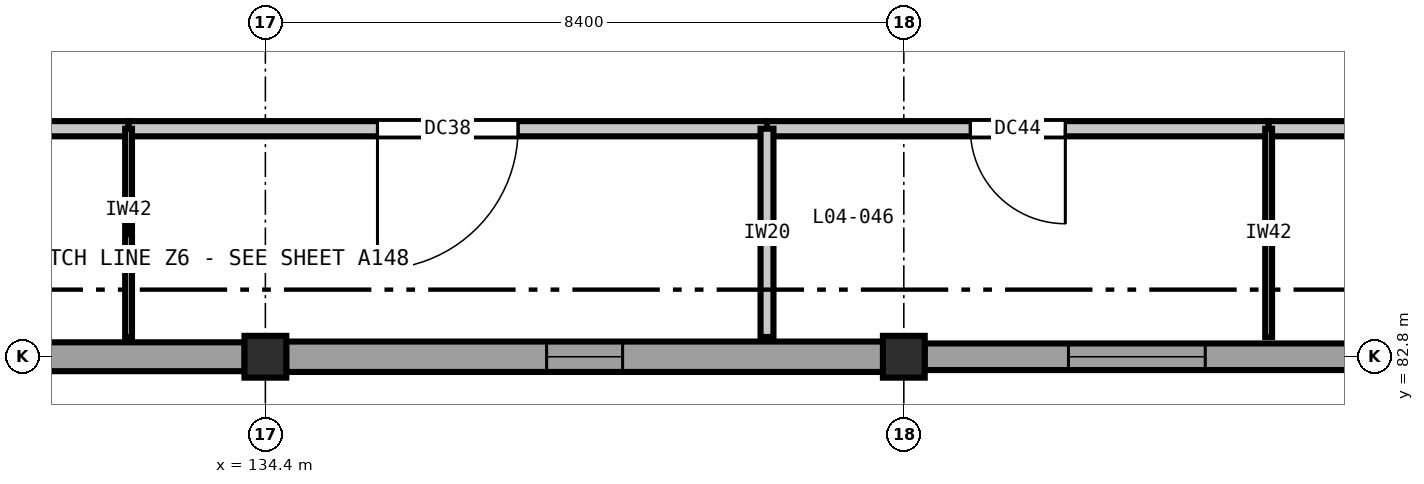
"""IFC4 building model, lengths in metres.
Left out: names, types, materials, properties, quantities, classifications, styles, units other than length and angle.
Written with IfcOpenShell. Run it as: python <this file> out.ifc"""

import sys

from ifc_helpers import new_model, si_unit, direction, frame, frame_2d, origin, origin_2d, place, context, subcontext, project, spatial, rectangle, extrude, element, fill, save


model = new_model("IFC4")
c1 = context("Model", 3, precision=1e-05, world=origin(), true_north=direction((0.0, 1.0)))
c2 = subcontext(c1, "Body", "Model", "MODEL_VIEW")
j1 = project(units=[si_unit("LENGTHUNIT", "METRE"), si_unit("PLANEANGLEUNIT", "RADIAN")], contexts=[c1])
p1 = place(None, origin())
s1 = spatial("IfcSite", under=j1, at=p1, CompositionType="ELEMENT")
p2 = place(p1, origin())
s2 = spatial("IfcBuilding", under=s1, at=p2, CompositionType="ELEMENT")
p3 = place(p2, frame((0.0, 0.0, 20.4)))
s3 = spatial("IfcBuildingStorey", under=s2, at=p3, CompositionType="ELEMENT", Elevation=20.4)
for number, where, z_axis, x_axis in (
    (1, (134.4, 82.8, 0.0), (0.0, 0.0, 1.0), (1.0, 0.0, 0.0)),
    (2, (142.8, 82.8, 0.0), (0.0, 0.0, 1.0), (1.0, 0.0, 0.0)),
):
    element("IfcColumn", number, at=place(p3, frame(where, z_axis=z_axis, x_axis=x_axis)), inside=s3, PredefinedType="COLUMN", context=c2, shape_type="SweptSolid", body=[
        extrude(rectangle(XDim=0.55, YDim=0.55, at=origin_2d()), origin(), (0.0, 0.0, 1.0), 4.2),
    ])
p4 = place(p3, frame((150.927, 82.8, 0.0), z_axis=(0.0, 0.0, 1.0), x_axis=(-1.0, 0.0, 0.0)))
e3 = element("IfcWall", 3, at=p4, inside=s3, PredefinedType="SOLIDWALL", context=c2, shape_type="SweptSolid", body=[
    extrude(rectangle(XDim=7.854, YDim=0.35, at=frame_2d((3.927, 0.0))), origin(), (0.0, 0.0, 1.0), 3.48),
])
p5 = place(p4, frame((4.161, 0.0, 0.9)))
e4 = element("IfcOpeningElement", 4, at=p5, cuts=e3, PredefinedType="OPENING", context=c2, shape_type="SweptSolid", body=[
    extrude(rectangle(XDim=1.8, YDim=1.55, at=frame_2d((0.9, 0.775))), frame((0.0, 0.185, 0.0), z_axis=(0.0, -1.0, 0.0), x_axis=(1.0, 0.0, 0.0)), (0.0, 0.0, 1.0), 0.37),
])
p6 = place(p3, frame((142.527, 82.8, 0.0), z_axis=(0.0, 0.0, 1.0), x_axis=(-1.0, 0.0, 0.0)))
e5 = element("IfcWall", 5, at=p6, inside=s3, PredefinedType="SOLIDWALL", context=c2, shape_type="SweptSolid", body=[
    extrude(rectangle(XDim=7.854, YDim=0.4, at=frame_2d((3.927, 0.0))), origin(), (0.0, 0.0, 1.0), 3.48),
])
p7 = place(p6, frame((3.427, 0.0, 0.9)))
e6 = element("IfcOpeningElement", 6, at=p7, cuts=e5, PredefinedType="OPENING", context=c2, shape_type="SweptSolid", body=[
    extrude(rectangle(XDim=1.0, YDim=1.75, at=frame_2d((0.5, 0.875))), frame((0.0, 0.21, 0.0), z_axis=(0.0, -1.0, 0.0), x_axis=(1.0, 0.0, 0.0)), (0.0, 0.0, 1.0), 0.42),
])
p8 = place(p3, frame((134.127, 82.8, 0.0), z_axis=(0.0, 0.0, 1.0), x_axis=(-1.0, 0.0, 0.0)))
e7 = element("IfcWall", 7, at=p8, inside=s3, PredefinedType="SOLIDWALL", context=c2, shape_type="SweptSolid", body=[
    extrude(rectangle(XDim=7.854, YDim=0.38, at=frame_2d((3.927, 0.0))), origin(), (0.0, 0.0, 1.0), 3.48),
])
p9 = place(p8, frame((3.352, 0.0, 0.9)))
e8 = element("IfcOpeningElement", 8, at=p9, cuts=e7, PredefinedType="OPENING", context=c2, shape_type="SweptSolid", body=[
    extrude(rectangle(XDim=1.15, YDim=1.75, at=frame_2d((0.575, 0.875))), frame((0.0, 0.2, 0.0), z_axis=(0.0, -1.0, 0.0), x_axis=(1.0, 0.0, 0.0)), (0.0, 0.0, 1.0), 0.4),
])
p10 = place(p3, frame((126.0, 85.8, 0.0), z_axis=(0.0, 0.0, 1.0), x_axis=(1.0, 0.0, 0.0)))
e9 = element("IfcWall", 9, at=p10, inside=s3, PredefinedType="PARTITIONING", context=c2, shape_type="SweptSolid", body=[
    extrude(rectangle(XDim=6.6, YDim=0.2, at=frame_2d((3.3, 0.0))), origin(), (0.0, 0.0, 1.0), 3.82),
])
p11 = place(p10, frame((2.45, 0.0, 0.0)))
e10 = element("IfcOpeningElement", 10, at=p11, cuts=e9, PredefinedType="OPENING", context=c2, shape_type="SweptSolid", body=[
    extrude(rectangle(XDim=1.7, YDim=2.3, at=frame_2d((0.85, 1.15))), frame((0.0, 0.11, 0.0), z_axis=(0.0, -1.0, 0.0), x_axis=(1.0, 0.0, 0.0)), (0.0, 0.0, 1.0), 0.22),
])
p12 = place(p3, frame((132.6, 85.8, 0.0), z_axis=(0.0, 0.0, 1.0), x_axis=(1.0, 0.0, 0.0)))
e11 = element("IfcWall", 11, at=p12, inside=s3, PredefinedType="PARTITIONING", context=c2, shape_type="SweptSolid", body=[
    extrude(rectangle(XDim=8.4, YDim=0.2, at=frame_2d((4.2, 0.0))), origin(), (0.0, 0.0, 1.0), 3.82),
])
p13 = place(p12, frame((3.275, 0.0, 0.0)))
e12 = element("IfcOpeningElement", 12, at=p13, cuts=e11, PredefinedType="OPENING", context=c2, shape_type="SweptSolid", body=[
    extrude(rectangle(XDim=1.85, YDim=2.3, at=frame_2d((0.925, 1.15))), frame((0.0, 0.11, 0.0), z_axis=(0.0, -1.0, 0.0), x_axis=(1.0, 0.0, 0.0)), (0.0, 0.0, 1.0), 0.22),
])
p14 = place(p3, frame((141.0, 85.8, 0.0), z_axis=(0.0, 0.0, 1.0), x_axis=(1.0, 0.0, 0.0)))
e13 = element("IfcWall", 13, at=p14, inside=s3, PredefinedType="PARTITIONING", context=c2, shape_type="SweptSolid", body=[
    extrude(rectangle(XDim=6.6, YDim=0.2, at=frame_2d((3.3, 0.0))), origin(), (0.0, 0.0, 1.0), 3.82),
])
p15 = place(p14, frame((2.675, 0.0, 0.0)))
e14 = element("IfcOpeningElement", 14, at=p15, cuts=e13, PredefinedType="OPENING", context=c2, shape_type="SweptSolid", body=[
    extrude(rectangle(XDim=1.25, YDim=2.15, at=frame_2d((0.625, 1.075))), frame((0.0, 0.11, 0.0), z_axis=(0.0, -1.0, 0.0), x_axis=(1.0, 0.0, 0.0)), (0.0, 0.0, 1.0), 0.22),
])
p16 = place(p3, frame((147.6, 85.8, 0.0), z_axis=(0.0, 0.0, 1.0), x_axis=(1.0, 0.0, 0.0)))
e15 = element("IfcWall", 15, at=p16, inside=s3, PredefinedType="PARTITIONING", context=c2, shape_type="SweptSolid", body=[
    extrude(rectangle(XDim=3.6, YDim=0.2, at=frame_2d((1.8, 0.0))), origin(), (0.0, 0.0, 1.0), 3.82),
])
p17 = place(p16, frame((1.15, 0.0, 0.0)))
e16 = element("IfcOpeningElement", 16, at=p17, cuts=e15, PredefinedType="OPENING", context=c2, shape_type="SweptSolid", body=[
    extrude(rectangle(XDim=1.3, YDim=2.2, at=frame_2d((0.65, 1.1))), frame((0.0, 0.11, 0.0), z_axis=(0.0, -1.0, 0.0), x_axis=(1.0, 0.0, 0.0)), (0.0, 0.0, 1.0), 0.22),
])
p18 = place(p3, frame((132.6, 83.06, 0.0), z_axis=(0.0, 0.0, 1.0), x_axis=(0.0, 1.0, 0.0)))
e17 = element("IfcWall", 17, at=p18, inside=s3, PredefinedType="PARTITIONING", context=c2, shape_type="SweptSolid", body=[
    extrude(rectangle(XDim=2.74, YDim=0.09, at=frame_2d((1.37, 0.0))), origin(), (0.0, 0.0, 1.0), 3.82),
])
p19 = place(p3, frame((141.0, 83.06, 0.0), z_axis=(0.0, 0.0, 1.0), x_axis=(0.0, 1.0, 0.0)))
e18 = element("IfcWall", 18, at=p19, inside=s3, PredefinedType="PARTITIONING", context=c2, shape_type="SweptSolid", body=[
    extrude(rectangle(XDim=2.74, YDim=0.17, at=frame_2d((1.37, 0.0))), origin(), (0.0, 0.0, 1.0), 3.82),
])
p20 = place(p3, frame((147.6, 83.06, 0.0), z_axis=(0.0, 0.0, 1.0), x_axis=(0.0, 1.0, 0.0)))
e19 = element("IfcWall", 19, at=p20, inside=s3, PredefinedType="PARTITIONING", context=c2, shape_type="SweptSolid", body=[
    extrude(rectangle(XDim=2.74, YDim=0.09, at=frame_2d((1.37, 0.0))), origin(), (0.0, 0.0, 1.0), 3.82),
])
p21 = place(p5, origin())
e20 = element("IfcWindow", 20, at=p21, inside=s3, PartitioningType="DOUBLE_PANEL_VERTICAL", PredefinedType="WINDOW", context=c2, shape_type="SweptSolid", body=[
    extrude(rectangle(XDim=1.8, YDim=1.55, at=frame_2d((0.9, 0.775))), frame((0.0, 0.03, 0.0), z_axis=(0.0, -1.0, 0.0), x_axis=(1.0, 0.0, 0.0)), (0.0, 0.0, 1.0), 0.06),
])
fill(e4, e20)
p22 = place(p7, origin())
e21 = element("IfcWindow", 21, at=p22, inside=s3, PartitioningType="SINGLE_PANEL", PredefinedType="WINDOW", context=c2, shape_type="SweptSolid", body=[
    extrude(rectangle(XDim=1.0, YDim=1.75, at=frame_2d((0.5, 0.875))), frame((0.0, 0.03, 0.0), z_axis=(0.0, -1.0, 0.0), x_axis=(1.0, 0.0, 0.0)), (0.0, 0.0, 1.0), 0.06),
])
fill(e6, e21)
p23 = place(p13, frame((1.85, 0.0, 0.0), z_axis=(0.0, 0.0, 1.0), x_axis=(-1.0, 0.0, 0.0)))
e22 = element("IfcDoor", 22, at=p23, inside=s3, OperationType="SINGLE_SWING_RIGHT", PredefinedType="DOOR", context=c2, shape_type="SweptSolid", body=[
    extrude(rectangle(XDim=1.85, YDim=2.3, at=frame_2d((0.925, 1.15))), frame((0.0, 0.025, 0.0), z_axis=(0.0, -1.0, 0.0), x_axis=(1.0, 0.0, 0.0)), (0.0, 0.0, 1.0), 0.05),
])
fill(e12, e22)
p24 = place(p15, frame((1.25, 0.0, 0.0), z_axis=(0.0, 0.0, 1.0), x_axis=(-1.0, 0.0, 0.0)))
e23 = element("IfcDoor", 23, at=p24, inside=s3, OperationType="SINGLE_SWING_LEFT", PredefinedType="DOOR", context=c2, shape_type="SweptSolid", body=[
    extrude(rectangle(XDim=1.25, YDim=2.15, at=frame_2d((0.625, 1.075))), frame((0.0, 0.025, 0.0), z_axis=(0.0, -1.0, 0.0), x_axis=(1.0, 0.0, 0.0)), (0.0, 0.0, 1.0), 0.05),
])
fill(e14, e23)
save(model, sys.argv[1])
